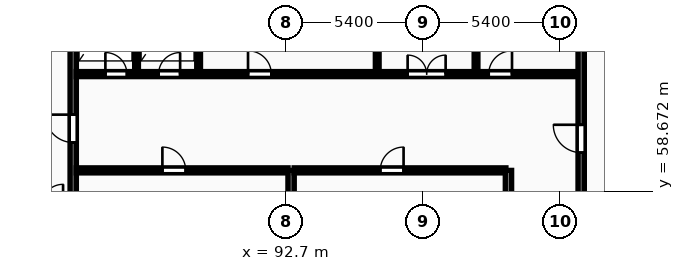
"""IFC4 building model, lengths in metres.
Left out: names, types, materials, properties, quantities, classifications, styles, units other than length and angle.
Written with IfcOpenShell. Run it as: python <this file> out.ifc"""

import sys

from ifc_helpers import new_model, si_unit, direction, frame, frame_2d, origin, place, context, subcontext, project, spatial, rectangle, extrude, element, fill, save


model = new_model("IFC4")
c1 = context("Model", 3, precision=1e-05, world=origin(), true_north=direction((0.0, 1.0)))
c2 = subcontext(c1, "Body", "Model", "MODEL_VIEW")
j1 = project(units=[si_unit("LENGTHUNIT", "METRE"), si_unit("PLANEANGLEUNIT", "RADIAN")], contexts=[c1])
p1 = place(None, origin())
s1 = spatial("IfcSite", under=j1, at=p1, CompositionType="ELEMENT")
p2 = place(p1, origin())
s2 = spatial("IfcBuilding", under=s1, at=p2, CompositionType="ELEMENT")
p3 = place(p2, frame((0.0, 0.0, 249.35)))
s3 = spatial("IfcBuildingStorey", under=s2, at=p3, CompositionType="ELEMENT", Elevation=249.35)
p4 = place(p3, frame((84.3, 55.4, 0.0), z_axis=(0.0, 0.0, 1.0), x_axis=(0.0, 1.0, 0.0)))
e1 = element("IfcWall", 1, at=p4, inside=s3, PredefinedType="SHEAR", context=c2, shape_type="SweptSolid", body=[
    extrude(rectangle(XDim=11.6, YDim=0.25, at=frame_2d((5.8, 0.0))), origin(), (0.0, 0.0, 1.0), 3.45),
])
p5 = place(p4, frame((5.2, 0.0, 0.0)))
e2 = element("IfcOpeningElement", 2, at=p5, cuts=e1, PredefinedType="OPENING", context=c2, shape_type="SweptSolid", body=[
    extrude(rectangle(XDim=1.1, YDim=2.1, at=frame_2d((0.55, 1.05))), frame((0.0, 0.135, 0.0), z_axis=(0.0, -1.0, 0.0), x_axis=(1.0, 0.0, 0.0)), (0.0, 0.0, 1.0), 0.27),
])
p6 = place(p3, frame((84.42, 59.5, 0.0), z_axis=(0.0, 0.0, 1.0), x_axis=(1.0, 0.0, 0.0)))
e3 = element("IfcWall", 3, at=p6, inside=s3, PredefinedType="PARTITIONING", context=c2, shape_type="SweptSolid", body=[
    extrude(rectangle(XDim=8.36, YDim=0.2, at=frame_2d((4.18, 0.0))), origin(), (0.0, 0.0, 1.0), 3.17),
])
p7 = place(p6, frame((3.4, 0.0, 0.0)))
e4 = element("IfcOpeningElement", 4, at=p7, cuts=e3, PredefinedType="OPENING", context=c2, shape_type="SweptSolid", body=[
    extrude(rectangle(XDim=0.92, YDim=2.08, at=frame_2d((0.46, 1.04))), frame((0.0, 0.11, 0.0), z_axis=(0.0, -1.0, 0.0), x_axis=(1.0, 0.0, 0.0)), (0.0, 0.0, 1.0), 0.22),
])
p8 = place(p3, frame((92.9, 55.4, 0.0), z_axis=(0.0, 0.0, 1.0), x_axis=(0.0, 1.0, 0.0)))
e5 = element("IfcWall", 5, at=p8, inside=s3, PredefinedType="SHEAR", context=c2, shape_type="SweptSolid", body=[
    extrude(rectangle(XDim=4.1, YDim=0.25, at=frame_2d((2.05, 0.0))), origin(), (0.0, 0.0, 1.0), 3.45),
])
p9 = place(p3, frame((93.02, 59.5, 0.0), z_axis=(0.0, 0.0, 1.0), x_axis=(1.0, 0.0, 0.0)))
e6 = element("IfcWall", 6, at=p9, inside=s3, PredefinedType="PARTITIONING", context=c2, shape_type="SweptSolid", body=[
    extrude(rectangle(XDim=8.36, YDim=0.2, at=frame_2d((4.18, 0.0))), origin(), (0.0, 0.0, 1.0), 3.17),
])
p10 = place(p9, frame((3.4, 0.0, 0.0)))
e7 = element("IfcOpeningElement", 7, at=p10, cuts=e6, PredefinedType="OPENING", context=c2, shape_type="SweptSolid", body=[
    extrude(rectangle(XDim=0.92, YDim=2.08, at=frame_2d((0.46, 1.04))), frame((0.0, 0.11, 0.0), z_axis=(0.0, -1.0, 0.0), x_axis=(1.0, 0.0, 0.0)), (0.0, 0.0, 1.0), 0.22),
])
p11 = place(p3, frame((101.48, 55.4, 0.0), z_axis=(0.0, 0.0, 1.0), x_axis=(0.0, 1.0, 0.0)))
e8 = element("IfcWall", 8, at=p11, inside=s3, PredefinedType="SHEAR", context=c2, shape_type="SweptSolid", body=[
    extrude(rectangle(XDim=4.1, YDim=0.25, at=frame_2d((2.05, 0.0))), origin(), (0.0, 0.0, 1.0), 3.45),
])
for number, where, z_axis, x_axis in (
    (9, (86.8, 63.4, 0.0), (0.0, 0.0, 1.0), (0.0, 1.0, 0.0)),
    (10, (89.25, 63.4, 0.0), (0.0, 0.0, 1.0), (0.0, 1.0, 0.0)),
    (11, (96.3, 63.4, 0.0), (0.0, 0.0, 1.0), (0.0, 1.0, 0.0)),
    (12, (100.2, 63.4, 0.0), (0.0, 0.0, 1.0), (0.0, 1.0, 0.0)),
):
    element("IfcWall", number, at=place(p3, frame(where, z_axis=z_axis, x_axis=x_axis)), inside=s3, PredefinedType="PARTITIONING", context=c2, shape_type="SweptSolid", body=[
        extrude(rectangle(XDim=3.6, YDim=0.15, at=frame_2d((1.8, 0.0))), origin(), (0.0, 0.0, 1.0), 3.17),
    ])
p12 = place(p3, frame((84.42, 63.3, 0.0), z_axis=(0.0, 0.0, 1.0), x_axis=(1.0, 0.0, 0.0)))
e13 = element("IfcWall", 13, at=p12, inside=s3, PredefinedType="PARTITIONING", context=c2, shape_type="SweptSolid", body=[
    extrude(rectangle(XDim=19.83, YDim=0.2, at=frame_2d((9.915, 0.0))), origin(), (0.0, 0.0, 1.0), 3.17),
])
p13 = place(p12, frame((1.15, 0.0, 0.0)))
e14 = element("IfcOpeningElement", 14, at=p13, cuts=e13, PredefinedType="OPENING", context=c2, shape_type="SweptSolid", body=[
    extrude(rectangle(XDim=0.85, YDim=2.05, at=frame_2d((0.425, 1.025))), frame((0.0, 0.11, 0.0), z_axis=(0.0, -1.0, 0.0), x_axis=(1.0, 0.0, 0.0)), (0.0, 0.0, 1.0), 0.22),
])
p14 = place(p12, frame((3.25, 0.0, 0.0)))
e15 = element("IfcOpeningElement", 15, at=p14, cuts=e13, PredefinedType="OPENING", context=c2, shape_type="SweptSolid", body=[
    extrude(rectangle(XDim=0.85, YDim=2.05, at=frame_2d((0.425, 1.025))), frame((0.0, 0.11, 0.0), z_axis=(0.0, -1.0, 0.0), x_axis=(1.0, 0.0, 0.0)), (0.0, 0.0, 1.0), 0.22),
])
p15 = place(p12, frame((13.08, 0.0, 0.0)))
e16 = element("IfcOpeningElement", 16, at=p15, cuts=e13, PredefinedType="OPENING", context=c2, shape_type="SweptSolid", body=[
    extrude(rectangle(XDim=1.5, YDim=2.2, at=frame_2d((0.75, 1.1))), frame((0.0, 0.11, 0.0), z_axis=(0.0, -1.0, 0.0), x_axis=(1.0, 0.0, 0.0)), (0.0, 0.0, 1.0), 0.22),
])
p16 = place(p12, frame((6.78, 0.0, 0.0)))
e17 = element("IfcOpeningElement", 17, at=p16, cuts=e13, PredefinedType="OPENING", context=c2, shape_type="SweptSolid", body=[
    extrude(rectangle(XDim=0.92, YDim=2.08, at=frame_2d((0.46, 1.04))), frame((0.0, 0.11, 0.0), z_axis=(0.0, -1.0, 0.0), x_axis=(1.0, 0.0, 0.0)), (0.0, 0.0, 1.0), 0.22),
])
p17 = place(p12, frame((16.28, 0.0, 0.0)))
e18 = element("IfcOpeningElement", 18, at=p17, cuts=e13, PredefinedType="OPENING", context=c2, shape_type="SweptSolid", body=[
    extrude(rectangle(XDim=0.92, YDim=2.08, at=frame_2d((0.46, 1.04))), frame((0.0, 0.11, 0.0), z_axis=(0.0, -1.0, 0.0), x_axis=(1.0, 0.0, 0.0)), (0.0, 0.0, 1.0), 0.22),
])
p18 = place(p3, frame((104.35, 58.4, 0.0), z_axis=(0.0, 0.0, 1.0), x_axis=(0.0, 1.0, 0.0)))
e19 = element("IfcWall", 19, at=p18, inside=s3, PredefinedType="SHEAR", context=c2, shape_type="SweptSolid", body=[
    extrude(rectangle(XDim=8.6, YDim=0.25, at=frame_2d((4.3, 0.0))), origin(), (0.0, 0.0, 1.0), 3.45),
])
p19 = place(p18, frame((1.8, 0.0, 0.0)))
e20 = element("IfcOpeningElement", 20, at=p19, cuts=e19, PredefinedType="OPENING", context=c2, shape_type="SweptSolid", body=[
    extrude(rectangle(XDim=1.1, YDim=2.1, at=frame_2d((0.55, 1.05))), frame((0.0, 0.135, 0.0), z_axis=(0.0, -1.0, 0.0), x_axis=(1.0, 0.0, 0.0)), (0.0, 0.0, 1.0), 0.27),
])
p20 = place(p5, origin())
e21 = element("IfcDoor", 21, at=p20, inside=s3, OperationType="SINGLE_SWING_RIGHT", PredefinedType="DOOR", context=c2, shape_type="SweptSolid", body=[
    extrude(rectangle(XDim=1.1, YDim=2.1, at=frame_2d((0.55, 1.05))), frame((0.0, 0.025, 0.0), z_axis=(0.0, -1.0, 0.0), x_axis=(1.0, 0.0, 0.0)), (0.0, 0.0, 1.0), 0.05),
])
fill(e2, e21)
p21 = place(p7, origin())
e22 = element("IfcDoor", 22, at=p21, inside=s3, OperationType="SINGLE_SWING_LEFT", PredefinedType="DOOR", context=c2, shape_type="SweptSolid", body=[
    extrude(rectangle(XDim=0.92, YDim=2.08, at=frame_2d((0.46, 1.04))), frame((0.0, 0.025, 0.0), z_axis=(0.0, -1.0, 0.0), x_axis=(1.0, 0.0, 0.0)), (0.0, 0.0, 1.0), 0.05),
])
fill(e4, e22)
p22 = place(p10, origin())
e23 = element("IfcDoor", 23, at=p22, inside=s3, OperationType="SINGLE_SWING_RIGHT", PredefinedType="DOOR", context=c2, shape_type="SweptSolid", body=[
    extrude(rectangle(XDim=0.92, YDim=2.08, at=frame_2d((0.46, 1.04))), frame((0.0, 0.025, 0.0), z_axis=(0.0, -1.0, 0.0), x_axis=(1.0, 0.0, 0.0)), (0.0, 0.0, 1.0), 0.05),
])
fill(e7, e23)
p23 = place(p13, origin())
e24 = element("IfcDoor", 24, at=p23, inside=s3, OperationType="SINGLE_SWING_LEFT", PredefinedType="DOOR", context=c2, shape_type="SweptSolid", body=[
    extrude(rectangle(XDim=0.85, YDim=2.05, at=frame_2d((0.425, 1.025))), frame((0.0, 0.025, 0.0), z_axis=(0.0, -1.0, 0.0), x_axis=(1.0, 0.0, 0.0)), (0.0, 0.0, 1.0), 0.05),
])
fill(e14, e24)
p24 = place(p14, origin())
e25 = element("IfcDoor", 25, at=p24, inside=s3, OperationType="SINGLE_SWING_RIGHT", PredefinedType="DOOR", context=c2, shape_type="SweptSolid", body=[
    extrude(rectangle(XDim=0.85, YDim=2.05, at=frame_2d((0.425, 1.025))), frame((0.0, 0.025, 0.0), z_axis=(0.0, -1.0, 0.0), x_axis=(1.0, 0.0, 0.0)), (0.0, 0.0, 1.0), 0.05),
])
fill(e15, e25)
p25 = place(p15, origin())
e26 = element("IfcDoor", 26, at=p25, inside=s3, OperationType="DOUBLE_DOOR_SINGLE_SWING", PredefinedType="DOOR", context=c2, shape_type="SweptSolid", body=[
    extrude(rectangle(XDim=1.5, YDim=2.2, at=frame_2d((0.75, 1.1))), frame((0.0, 0.025, 0.0), z_axis=(0.0, -1.0, 0.0), x_axis=(1.0, 0.0, 0.0)), (0.0, 0.0, 1.0), 0.05),
])
fill(e16, e26)
p26 = place(p16, origin())
e27 = element("IfcDoor", 27, at=p26, inside=s3, OperationType="SINGLE_SWING_LEFT", PredefinedType="DOOR", context=c2, shape_type="SweptSolid", body=[
    extrude(rectangle(XDim=0.92, YDim=2.08, at=frame_2d((0.46, 1.04))), frame((0.0, 0.025, 0.0), z_axis=(0.0, -1.0, 0.0), x_axis=(1.0, 0.0, 0.0)), (0.0, 0.0, 1.0), 0.05),
])
fill(e17, e27)
p27 = place(p17, origin())
e28 = element("IfcDoor", 28, at=p27, inside=s3, OperationType="SINGLE_SWING_RIGHT", PredefinedType="DOOR", context=c2, shape_type="SweptSolid", body=[
    extrude(rectangle(XDim=0.92, YDim=2.08, at=frame_2d((0.46, 1.04))), frame((0.0, 0.025, 0.0), z_axis=(0.0, -1.0, 0.0), x_axis=(1.0, 0.0, 0.0)), (0.0, 0.0, 1.0), 0.05),
])
fill(e18, e28)
p28 = place(p19, origin())
e29 = element("IfcDoor", 29, at=p28, inside=s3, OperationType="SINGLE_SWING_RIGHT", PredefinedType="DOOR", context=c2, shape_type="SweptSolid", body=[
    extrude(rectangle(XDim=1.1, YDim=2.1, at=frame_2d((0.55, 1.05))), frame((0.0, 0.025, 0.0), z_axis=(0.0, -1.0, 0.0), x_axis=(1.0, 0.0, 0.0)), (0.0, 0.0, 1.0), 0.05),
])
fill(e20, e29)
save(model, sys.argv[1])
